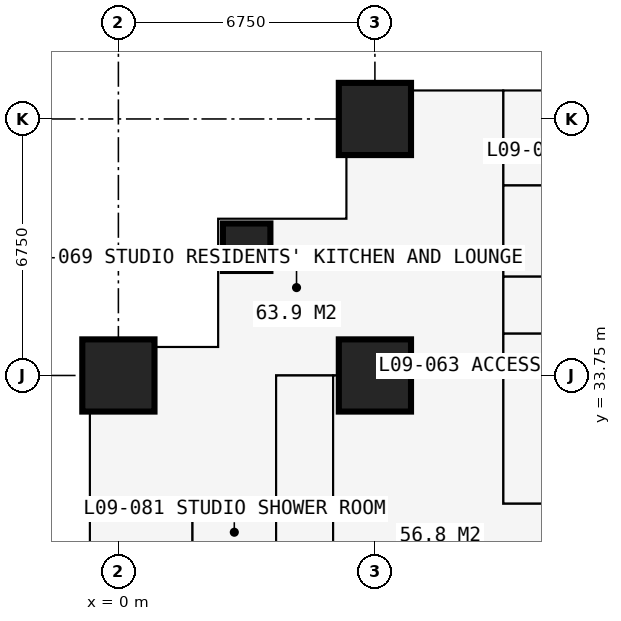
"""IFC4 building model, lengths in metres.
Left out: names, types, materials, properties, quantities, classifications, styles, units other than length and angle.
Written with IfcOpenShell. Run it as: python <this file> out.ifc"""

import sys

from ifc_helpers import new_model, si_unit, direction, frame, frame_2d, origin, origin_2d, place, context, subcontext, project, spatial, rectangle, extrude, element, fill, save


model = new_model("IFC4")
c1 = context("Model", 3, precision=1e-05, world=origin(), true_north=direction((0.0, 1.0)))
c2 = subcontext(c1, "Body", "Model", "MODEL_VIEW")
j1 = project(units=[si_unit("LENGTHUNIT", "METRE"), si_unit("PLANEANGLEUNIT", "RADIAN")], contexts=[c1])
p1 = place(None, origin())
s1 = spatial("IfcSite", under=j1, at=p1, CompositionType="ELEMENT")
p2 = place(p1, origin())
s2 = spatial("IfcBuilding", under=s1, at=p2, CompositionType="ELEMENT")
p3 = place(p2, frame((0.0, 0.0, 36.0)))
s3 = spatial("IfcBuildingStorey", under=s2, at=p3, CompositionType="ELEMENT", Elevation=36.0)
p4 = place(p3, frame((0.0, 33.75, 0.0), z_axis=(0.0, 0.0, 1.0), x_axis=(1.0, 0.0, 0.0)))
e1 = element("IfcColumn", 1, at=p4, inside=s3, PredefinedType="COLUMN", context=c2, shape_type="SweptSolid", body=[
    extrude(rectangle(XDim=1.9, YDim=1.9, at=origin_2d()), origin(), (0.0, 0.0, 1.0), 3.6),
])
p5 = place(p3, frame((3.375, 37.125, 0.0), z_axis=(0.0, 0.0, 1.0), x_axis=(1.0, 0.0, 0.0)))
e2 = element("IfcColumn", 2, at=p5, inside=s3, PredefinedType="COLUMN", context=c2, shape_type="SweptSolid", body=[
    extrude(rectangle(XDim=1.25, YDim=1.25, at=origin_2d()), origin(), (0.0, 0.0, 1.0), 3.6),
])
for number, where, z_axis, x_axis in (
    (3, (6.75, 33.75, 0.0), (0.0, 0.0, 1.0), (1.0, 0.0, 0.0)),
    (4, (6.75, 40.5, 0.0), (0.0, 0.0, 1.0), (1.0, 0.0, 0.0)),
):
    element("IfcColumn", number, at=place(p3, frame(where, z_axis=z_axis, x_axis=x_axis)), inside=s3, PredefinedType="COLUMN", context=c2, shape_type="SweptSolid", body=[
        extrude(rectangle(XDim=1.9, YDim=1.9, at=origin_2d()), origin(), (0.0, 0.0, 1.0), 3.6),
    ])
p6 = place(p3, frame((6.0, 41.25, 0.0), z_axis=(0.0, 0.0, 1.0), x_axis=(0.0, -1.0, 0.0)))
e5 = element("IfcWall", 5, at=p6, inside=s3, PredefinedType="SOLIDWALL", context=c2, shape_type="SweptSolid", body=[
    extrude(rectangle(XDim=3.375, YDim=0.3, at=frame_2d((1.688, 0.0))), origin(), (0.0, 0.0, 1.0), 3.375),
])
p7 = place(p6, frame((1.857, 0.0, 0.9)))
e6 = element("IfcOpeningElement", 6, at=p7, cuts=e5, PredefinedType="OPENING", context=c2, shape_type="SweptSolid", body=[
    extrude(rectangle(XDim=1.2, YDim=1.8, at=frame_2d((0.6, 0.9))), frame((0.0, 0.16, 0.0), z_axis=(0.0, -1.0, 0.0), x_axis=(1.0, 0.0, 0.0)), (0.0, 0.0, 1.0), 0.32),
])
p8 = place(p3, frame((6.0, 37.875, 0.0), z_axis=(0.0, 0.0, 1.0), x_axis=(-1.0, 0.0, 0.0)))
e7 = element("IfcWall", 7, at=p8, inside=s3, PredefinedType="SOLIDWALL", context=c2, shape_type="SweptSolid", body=[
    extrude(rectangle(XDim=3.375, YDim=0.3, at=frame_2d((1.688, 0.0))), origin(), (0.0, 0.0, 1.0), 3.375),
])
p9 = place(p8, frame((0.788, 0.0, 0.6)))
e8 = element("IfcOpeningElement", 8, at=p9, cuts=e7, PredefinedType="OPENING", context=c2, shape_type="SweptSolid", body=[
    extrude(rectangle(XDim=1.8, YDim=2.1, at=frame_2d((0.9, 1.05))), frame((0.0, 0.16, 0.0), z_axis=(0.0, -1.0, 0.0), x_axis=(1.0, 0.0, 0.0)), (0.0, 0.0, 1.0), 0.32),
])
p10 = place(p3, frame((2.625, 37.875, 0.0), z_axis=(0.0, 0.0, 1.0), x_axis=(0.0, -1.0, 0.0)))
e9 = element("IfcWall", 9, at=p10, inside=s3, PredefinedType="SOLIDWALL", context=c2, shape_type="SweptSolid", body=[
    extrude(rectangle(XDim=3.375, YDim=0.3, at=frame_2d((1.688, 0.0))), origin(), (0.0, 0.0, 1.0), 3.375),
])
p11 = place(p10, frame((0.788, 0.0, 0.6)))
e10 = element("IfcOpeningElement", 10, at=p11, cuts=e9, PredefinedType="OPENING", context=c2, shape_type="SweptSolid", body=[
    extrude(rectangle(XDim=1.8, YDim=2.1, at=frame_2d((0.9, 1.05))), frame((0.0, 0.16, 0.0), z_axis=(0.0, -1.0, 0.0), x_axis=(1.0, 0.0, 0.0)), (0.0, 0.0, 1.0), 0.32),
])
p12 = place(p3, frame((2.625, 34.5, 0.0), z_axis=(0.0, 0.0, 1.0), x_axis=(-1.0, 0.0, 0.0)))
e11 = element("IfcWall", 11, at=p12, inside=s3, PredefinedType="SOLIDWALL", context=c2, shape_type="SweptSolid", body=[
    extrude(rectangle(XDim=3.375, YDim=0.3, at=frame_2d((1.688, 0.0))), origin(), (0.0, 0.0, 1.0), 3.375),
])
p13 = place(p12, frame((0.317, 0.0, 0.9)))
e12 = element("IfcOpeningElement", 12, at=p13, cuts=e11, PredefinedType="OPENING", context=c2, shape_type="SweptSolid", body=[
    extrude(rectangle(XDim=1.2, YDim=1.8, at=frame_2d((0.6, 0.9))), frame((0.0, 0.16, 0.0), z_axis=(0.0, -1.0, 0.0), x_axis=(1.0, 0.0, 0.0)), (0.0, 0.0, 1.0), 0.32),
])
p14 = place(p3, frame((-0.734, 30.375, 0.0), z_axis=(0.0, 0.0, 1.0), x_axis=(1.0, 0.0, 0.0)))
e13 = element("IfcWall", 13, at=p14, inside=s3, PredefinedType="PARTITIONING", context=c2, shape_type="SweptSolid", body=[
    extrude(rectangle(XDim=4.884, YDim=0.15, at=frame_2d((2.442, 0.0))), origin(), (0.0, 0.0, 1.0), 3.375),
])
p15 = place(p3, frame((1.95, 28.375, 0.0), z_axis=(0.0, 0.0, 1.0), x_axis=(0.0, 1.0, 0.0)))
e14 = element("IfcWall", 14, at=p15, inside=s3, PredefinedType="PARTITIONING", context=c2, shape_type="SweptSolid", body=[
    extrude(rectangle(XDim=2.0, YDim=0.1, at=frame_2d((1.0, 0.0))), origin(), (0.0, 0.0, 1.0), 3.375),
])
p16 = place(p3, frame((4.15, 10.125, 0.0), z_axis=(0.0, 0.0, 1.0), x_axis=(0.0, 1.0, 0.0)))
e15 = element("IfcWall", 15, at=p16, inside=s3, PredefinedType="PARTITIONING", context=c2, shape_type="SweptSolid", body=[
    extrude(rectangle(XDim=23.625, YDim=0.1, at=frame_2d((11.812, 0.0))), origin(), (0.0, 0.0, 1.0), 3.375),
])
p17 = place(p16, frame((0.2, 0.0, 0.0)))
e16 = element("IfcOpeningElement", 16, at=p17, cuts=e15, PredefinedType="OPENING", context=c2, shape_type="SweptSolid", body=[
    extrude(rectangle(XDim=0.95, YDim=2.2, at=frame_2d((0.475, 1.1))), frame((0.0, 0.06, 0.0), z_axis=(0.0, -1.0, 0.0), x_axis=(1.0, 0.0, 0.0)), (0.0, 0.0, 1.0), 0.12),
])
p18 = place(p16, frame((3.625, 0.0, 0.0)))
e17 = element("IfcOpeningElement", 17, at=p18, cuts=e15, PredefinedType="OPENING", context=c2, shape_type="SweptSolid", body=[
    extrude(rectangle(XDim=0.95, YDim=2.2, at=frame_2d((0.475, 1.1))), frame((0.0, 0.06, 0.0), z_axis=(0.0, -1.0, 0.0), x_axis=(1.0, 0.0, 0.0)), (0.0, 0.0, 1.0), 0.12),
])
p19 = place(p16, frame((7.0, 0.0, 0.0)))
e18 = element("IfcOpeningElement", 18, at=p19, cuts=e15, PredefinedType="OPENING", context=c2, shape_type="SweptSolid", body=[
    extrude(rectangle(XDim=0.95, YDim=2.2, at=frame_2d((0.475, 1.1))), frame((0.0, 0.06, 0.0), z_axis=(0.0, -1.0, 0.0), x_axis=(1.0, 0.0, 0.0)), (0.0, 0.0, 1.0), 0.12),
])
p20 = place(p16, frame((10.375, 0.0, 0.0)))
e19 = element("IfcOpeningElement", 19, at=p20, cuts=e15, PredefinedType="OPENING", context=c2, shape_type="SweptSolid", body=[
    extrude(rectangle(XDim=0.95, YDim=2.2, at=frame_2d((0.475, 1.1))), frame((0.0, 0.06, 0.0), z_axis=(0.0, -1.0, 0.0), x_axis=(1.0, 0.0, 0.0)), (0.0, 0.0, 1.0), 0.12),
])
p21 = place(p16, frame((13.75, 0.0, 0.0)))
e20 = element("IfcOpeningElement", 20, at=p21, cuts=e15, PredefinedType="OPENING", context=c2, shape_type="SweptSolid", body=[
    extrude(rectangle(XDim=0.95, YDim=2.2, at=frame_2d((0.475, 1.1))), frame((0.0, 0.06, 0.0), z_axis=(0.0, -1.0, 0.0), x_axis=(1.0, 0.0, 0.0)), (0.0, 0.0, 1.0), 0.12),
])
p22 = place(p16, frame((17.125, 0.0, 0.0)))
e21 = element("IfcOpeningElement", 21, at=p22, cuts=e15, PredefinedType="OPENING", context=c2, shape_type="SweptSolid", body=[
    extrude(rectangle(XDim=0.95, YDim=2.2, at=frame_2d((0.475, 1.1))), frame((0.0, 0.06, 0.0), z_axis=(0.0, -1.0, 0.0), x_axis=(1.0, 0.0, 0.0)), (0.0, 0.0, 1.0), 0.12),
])
p23 = place(p3, frame((4.15, 33.75, 0.0), z_axis=(0.0, 0.0, 1.0), x_axis=(1.0, 0.0, 0.0)))
e22 = element("IfcWall", 22, at=p23, inside=s3, PredefinedType="PARTITIONING", context=c2, shape_type="SweptSolid", body=[
    extrude(rectangle(XDim=5.975, YDim=0.15, at=frame_2d((2.988, 0.0))), origin(), (0.0, 0.0, 1.0), 2.877),
])
p24 = place(p3, frame((5.65, 22.988, 0.0), z_axis=(0.0, 0.0, 1.0), x_axis=(0.0, 1.0, 0.0)))
e23 = element("IfcWall", 23, at=p24, inside=s3, PredefinedType="PARTITIONING", context=c2, shape_type="SweptSolid", body=[
    extrude(rectangle(XDim=10.762, YDim=0.15, at=frame_2d((5.381, 0.0))), origin(), (0.0, 0.0, 1.0), 3.375),
])
p25 = place(p24, frame((5.0, 0.0, 0.0)))
e24 = element("IfcOpeningElement", 24, at=p25, cuts=e23, PredefinedType="OPENING", context=c2, shape_type="SweptSolid", body=[
    extrude(rectangle(XDim=0.95, YDim=2.2, at=frame_2d((0.475, 1.1))), frame((0.0, 0.085, 0.0), z_axis=(0.0, -1.0, 0.0), x_axis=(1.0, 0.0, 0.0)), (0.0, 0.0, 1.0), 0.17),
])
p26 = place(p3, frame((10.125, 30.375, 0.0), z_axis=(0.0, 0.0, 1.0), x_axis=(0.0, 1.0, 0.0)))
e25 = element("IfcWall", 25, at=p26, inside=s3, PredefinedType="PARTITIONING", context=c2, shape_type="SweptSolid", body=[
    extrude(rectangle(XDim=10.859, YDim=0.15, at=frame_2d((5.429, 0.0))), origin(), (0.0, 0.0, 1.0), 3.375),
])
p27 = place(p26, frame((4.725, 0.0, 0.0)))
e26 = element("IfcOpeningElement", 26, at=p27, cuts=e25, PredefinedType="OPENING", context=c2, shape_type="SweptSolid", body=[
    extrude(rectangle(XDim=1.0, YDim=2.2, at=frame_2d((0.5, 1.1))), frame((0.0, 0.085, 0.0), z_axis=(0.0, -1.0, 0.0), x_axis=(1.0, 0.0, 0.0)), (0.0, 0.0, 1.0), 0.17),
])
p28 = place(p3, frame((10.125, 30.375, 0.0), z_axis=(0.0, 0.0, 1.0), x_axis=(1.0, 0.0, 0.0)))
e27 = element("IfcWall", 27, at=p28, inside=s3, PredefinedType="PARTITIONING", context=c2, shape_type="SweptSolid", body=[
    extrude(rectangle(XDim=1.175, YDim=0.15, at=frame_2d((0.587, 0.0))), origin(), (0.0, 0.0, 1.0), 3.375),
])
p29 = place(p3, frame((10.125, 34.85, 0.0), z_axis=(0.0, 0.0, 1.0), x_axis=(1.0, 0.0, 0.0)))
e28 = element("IfcWall", 28, at=p29, inside=s3, PredefinedType="PARTITIONING", context=c2, shape_type="SweptSolid", body=[
    extrude(rectangle(XDim=10.762, YDim=0.15, at=frame_2d((5.381, 0.0))), origin(), (0.0, 0.0, 1.0), 3.375),
])
p30 = place(p29, frame((4.9, 0.0, 0.0)))
e29 = element("IfcOpeningElement", 29, at=p30, cuts=e28, PredefinedType="OPENING", context=c2, shape_type="SweptSolid", body=[
    extrude(rectangle(XDim=0.95, YDim=2.2, at=frame_2d((0.475, 1.1))), frame((0.0, 0.085, 0.0), z_axis=(0.0, -1.0, 0.0), x_axis=(1.0, 0.0, 0.0)), (0.0, 0.0, 1.0), 0.17),
])
p31 = place(p3, frame((10.125, 36.35, 0.0), z_axis=(0.0, 0.0, 1.0), x_axis=(1.0, 0.0, 0.0)))
e30 = element("IfcWall", 30, at=p31, inside=s3, PredefinedType="PARTITIONING", context=c2, shape_type="SweptSolid", body=[
    extrude(rectangle(XDim=23.625, YDim=0.15, at=frame_2d((11.812, 0.0))), origin(), (0.0, 0.0, 1.0), 3.375),
])
p32 = place(p31, frame((20.5, 0.0, 0.0)))
e31 = element("IfcOpeningElement", 31, at=p32, cuts=e30, PredefinedType="OPENING", context=c2, shape_type="SweptSolid", body=[
    extrude(rectangle(XDim=0.95, YDim=2.2, at=frame_2d((0.475, 1.1))), frame((0.0, 0.085, 0.0), z_axis=(0.0, -1.0, 0.0), x_axis=(1.0, 0.0, 0.0)), (0.0, 0.0, 1.0), 0.17),
])
p33 = place(p31, frame((17.125, 0.0, 0.0)))
e32 = element("IfcOpeningElement", 32, at=p33, cuts=e30, PredefinedType="OPENING", context=c2, shape_type="SweptSolid", body=[
    extrude(rectangle(XDim=0.95, YDim=2.2, at=frame_2d((0.475, 1.1))), frame((0.0, 0.085, 0.0), z_axis=(0.0, -1.0, 0.0), x_axis=(1.0, 0.0, 0.0)), (0.0, 0.0, 1.0), 0.17),
])
p34 = place(p31, frame((13.7, 0.0, 0.0)))
e33 = element("IfcOpeningElement", 33, at=p34, cuts=e30, PredefinedType="OPENING", context=c2, shape_type="SweptSolid", body=[
    extrude(rectangle(XDim=0.95, YDim=2.2, at=frame_2d((0.475, 1.1))), frame((0.0, 0.085, 0.0), z_axis=(0.0, -1.0, 0.0), x_axis=(1.0, 0.0, 0.0)), (0.0, 0.0, 1.0), 0.17),
])
p35 = place(p31, frame((4.2, 0.0, 0.0)))
e34 = element("IfcOpeningElement", 34, at=p35, cuts=e30, PredefinedType="OPENING", context=c2, shape_type="SweptSolid", body=[
    extrude(rectangle(XDim=0.95, YDim=2.2, at=frame_2d((0.475, 1.1))), frame((0.0, 0.085, 0.0), z_axis=(0.0, -1.0, 0.0), x_axis=(1.0, 0.0, 0.0)), (0.0, 0.0, 1.0), 0.17),
])
p36 = place(p31, frame((10.95, 0.0, 0.0)))
e35 = element("IfcOpeningElement", 35, at=p36, cuts=e30, PredefinedType="OPENING", context=c2, shape_type="SweptSolid", body=[
    extrude(rectangle(XDim=0.95, YDim=2.2, at=frame_2d((0.475, 1.1))), frame((0.0, 0.085, 0.0), z_axis=(0.0, -1.0, 0.0), x_axis=(1.0, 0.0, 0.0)), (0.0, 0.0, 1.0), 0.17),
])
p37 = place(p3, frame((10.125, 38.75, 0.0), z_axis=(0.0, 0.0, 1.0), x_axis=(1.0, 0.0, 0.0)))
e36 = element("IfcWall", 36, at=p37, inside=s3, PredefinedType="PARTITIONING", context=c2, shape_type="SweptSolid", body=[
    extrude(rectangle(XDim=2.6, YDim=0.1, at=frame_2d((1.3, 0.0))), origin(), (0.0, 0.0, 1.0), 3.375),
])
p38 = place(p37, frame((0.85, 0.0, 0.0)))
e37 = element("IfcOpeningElement", 37, at=p38, cuts=e36, PredefinedType="OPENING", context=c2, shape_type="SweptSolid", body=[
    extrude(rectangle(XDim=0.9, YDim=2.2, at=frame_2d((0.45, 1.1))), frame((0.0, 0.06, 0.0), z_axis=(0.0, -1.0, 0.0), x_axis=(1.0, 0.0, 0.0)), (0.0, 0.0, 1.0), 0.12),
])
p39 = place(p7, origin())
e38 = element("IfcWindow", 38, at=p39, inside=s3, PartitioningType="SINGLE_PANEL", PredefinedType="WINDOW", context=c2, shape_type="SweptSolid", body=[
    extrude(rectangle(XDim=1.2, YDim=1.8, at=frame_2d((0.6, 0.9))), frame((0.0, 0.03, 0.0), z_axis=(0.0, -1.0, 0.0), x_axis=(1.0, 0.0, 0.0)), (0.0, 0.0, 1.0), 0.06),
])
fill(e6, e38)
p40 = place(p9, origin())
e39 = element("IfcWindow", 39, at=p40, inside=s3, PartitioningType="SINGLE_PANEL", PredefinedType="WINDOW", context=c2, shape_type="SweptSolid", body=[
    extrude(rectangle(XDim=1.8, YDim=2.1, at=frame_2d((0.9, 1.05))), frame((0.0, 0.03, 0.0), z_axis=(0.0, -1.0, 0.0), x_axis=(1.0, 0.0, 0.0)), (0.0, 0.0, 1.0), 0.06),
])
fill(e8, e39)
p41 = place(p11, origin())
e40 = element("IfcWindow", 40, at=p41, inside=s3, PartitioningType="SINGLE_PANEL", PredefinedType="WINDOW", context=c2, shape_type="SweptSolid", body=[
    extrude(rectangle(XDim=1.8, YDim=2.1, at=frame_2d((0.9, 1.05))), frame((0.0, 0.03, 0.0), z_axis=(0.0, -1.0, 0.0), x_axis=(1.0, 0.0, 0.0)), (0.0, 0.0, 1.0), 0.06),
])
fill(e10, e40)
p42 = place(p13, origin())
e41 = element("IfcWindow", 41, at=p42, inside=s3, PartitioningType="SINGLE_PANEL", PredefinedType="WINDOW", context=c2, shape_type="SweptSolid", body=[
    extrude(rectangle(XDim=1.2, YDim=1.8, at=frame_2d((0.6, 0.9))), frame((0.0, 0.03, 0.0), z_axis=(0.0, -1.0, 0.0), x_axis=(1.0, 0.0, 0.0)), (0.0, 0.0, 1.0), 0.06),
])
fill(e12, e41)
p43 = place(p38, origin())
e42 = element("IfcDoor", 42, at=p43, inside=s3, OperationType="SINGLE_SWING_RIGHT", PredefinedType="DOOR", context=c2, shape_type="SweptSolid", body=[
    extrude(rectangle(XDim=0.9, YDim=2.2, at=frame_2d((0.45, 1.1))), frame((0.0, 0.025, 0.0), z_axis=(0.0, -1.0, 0.0), x_axis=(1.0, 0.0, 0.0)), (0.0, 0.0, 1.0), 0.05),
])
fill(e37, e42)
p44 = place(p27, origin())
e43 = element("IfcDoor", 43, at=p44, inside=s3, OperationType="SINGLE_SWING_LEFT", PredefinedType="DOOR", context=c2, shape_type="SweptSolid", body=[
    extrude(rectangle(XDim=1.0, YDim=2.2, at=frame_2d((0.5, 1.1))), frame((0.0, 0.025, 0.0), z_axis=(0.0, -1.0, 0.0), x_axis=(1.0, 0.0, 0.0)), (0.0, 0.0, 1.0), 0.05),
])
fill(e26, e43)
save(model, sys.argv[1])
